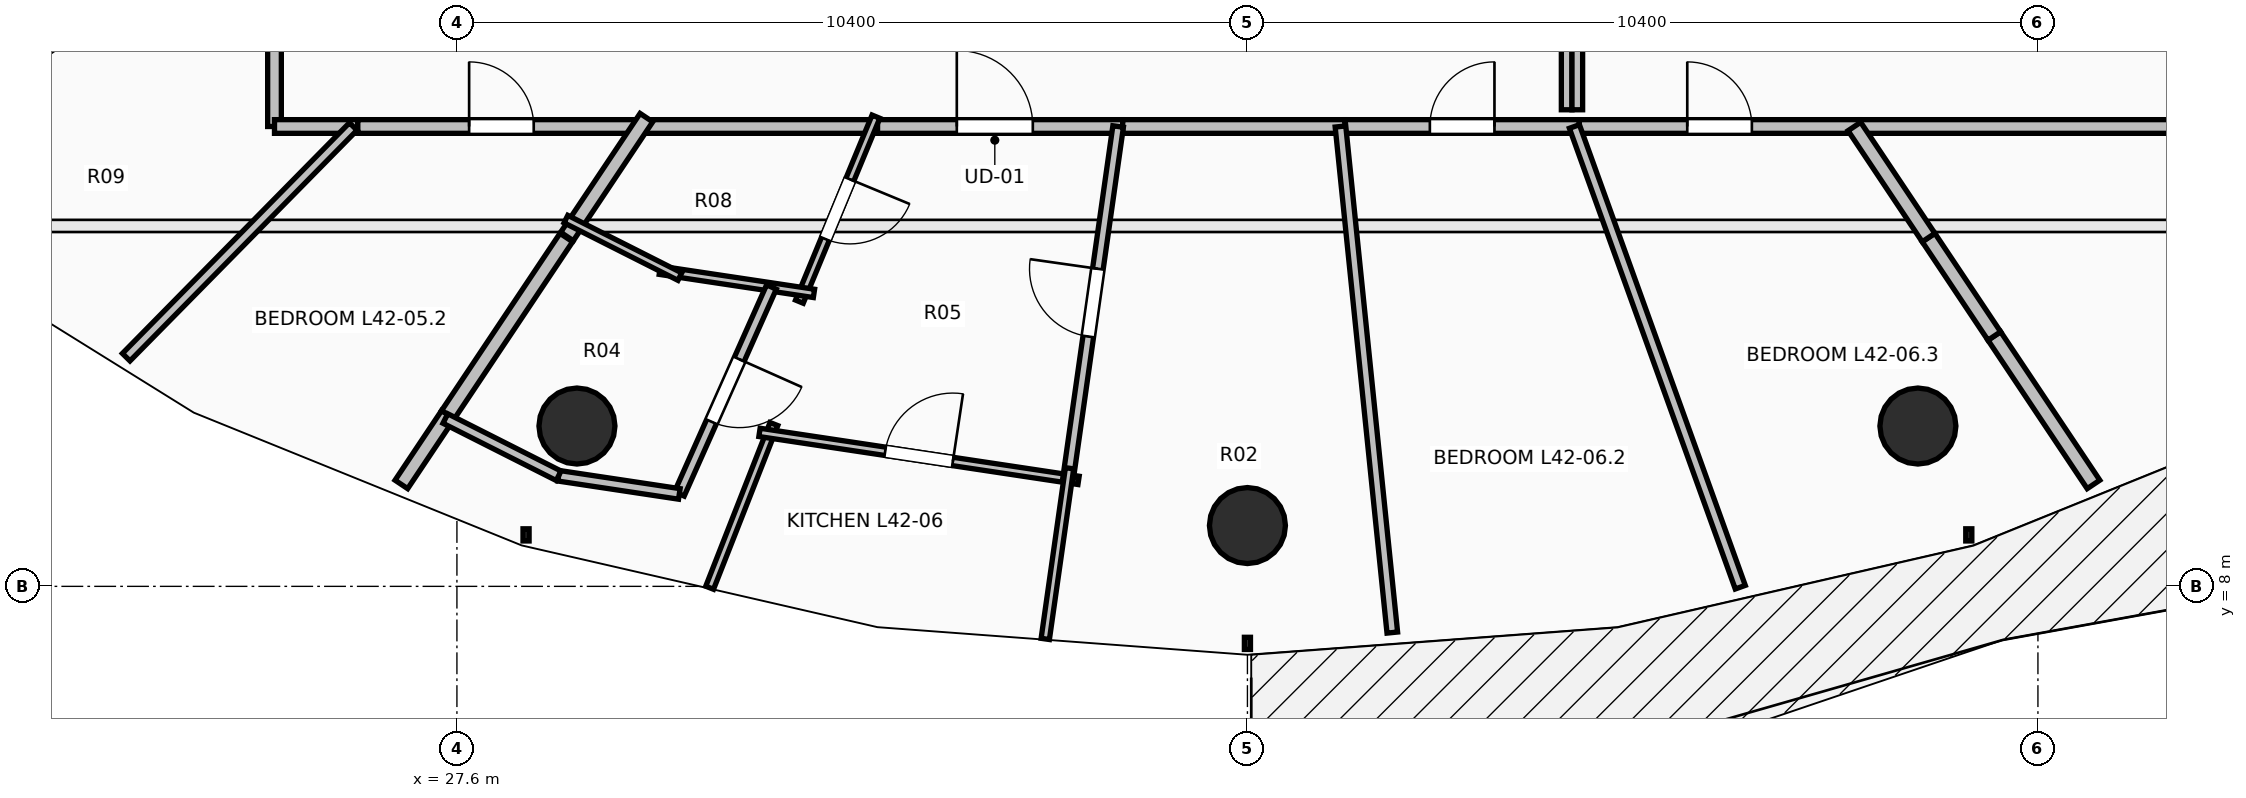
"""IFC4 building model, lengths in metres.
Left out: names, types, materials, properties, quantities, classifications, styles, units other than length and angle.
Written with IfcOpenShell. Run it as: python <this file> out.ifc"""

import sys

from ifc_helpers import new_model, si_unit, direction, frame, frame_2d, origin, origin_2d, place, context, subcontext, project, spatial, rectangle, circle, extrude, element, fill, save


model = new_model("IFC4")
c1 = context("Model", 3, precision=1e-05, world=origin(), true_north=direction((0.0, 1.0)))
c2 = subcontext(c1, "Body", "Model", "MODEL_VIEW")
j1 = project(units=[si_unit("LENGTHUNIT", "METRE"), si_unit("PLANEANGLEUNIT", "RADIAN")], contexts=[c1])
p1 = place(None, origin())
s1 = spatial("IfcSite", under=j1, at=p1, CompositionType="ELEMENT")
p2 = place(p1, origin())
s2 = spatial("IfcBuilding", under=s1, at=p2, CompositionType="ELEMENT")
p3 = place(p2, frame((0.0, 0.0, 157.1)))
s3 = spatial("IfcBuildingStorey", under=s2, at=p3, CompositionType="ELEMENT", Elevation=157.1)
for number, where, z_axis, x_axis in (
    (1, (29.179, 10.109, 0.0), (0.0, 0.0, 1.0), (-0.383, -0.924, 0.0)),
    (2, (38.0, 8.8, 0.0), (0.0, 0.0, 1.0), (0.0, -1.0, 0.0)),
    (3, (46.821, 10.109, 0.0), (0.0, 0.0, 1.0), (0.383, -0.924, 0.0)),
):
    element("IfcColumn", number, at=place(p3, frame(where, z_axis=z_axis, x_axis=x_axis)), inside=s3, PredefinedType="COLUMN", context=c2, shape_type="SweptSolid", body=[
        extrude(circle(Radius=0.5, at=origin_2d()), origin(), (0.0, 0.0, 1.0), 3.5),
    ])
p4 = place(p3, frame((25.2, 17.08, 0.0), z_axis=(0.0, 0.0, 1.0), x_axis=(0.0, -1.0, 0.0)))
e4 = element("IfcWall", 4, at=p4, inside=s3, PredefinedType="PARTITIONING", context=c2, shape_type="SweptSolid", body=[
    extrude(rectangle(XDim=3.03, YDim=0.18, at=frame_2d((1.515, 0.0))), origin(), (0.0, 0.0, 1.0), 2.432),
])
p5 = place(p3, frame((25.2, 14.05, 0.0), z_axis=(0.0, 0.0, 1.0), x_axis=(1.0, 0.0, 0.0)))
e5 = element("IfcWall", 5, at=p5, inside=s3, PredefinedType="PARTITIONING", context=c2, shape_type="SweptSolid", body=[
    extrude(rectangle(XDim=1.096, YDim=0.18, at=frame_2d((0.548, 0.0))), origin(), (0.0, 0.0, 1.0), 2.972),
])
p6 = place(p3, frame((26.296, 14.05, 0.0), z_axis=(0.0, 0.0, 1.0), x_axis=(1.0, 0.0, 0.0)))
e6 = element("IfcWall", 6, at=p6, inside=s3, PredefinedType="PARTITIONING", context=c2, shape_type="SweptSolid", body=[
    extrude(rectangle(XDim=3.779, YDim=0.18, at=frame_2d((1.89, 0.0))), origin(), (0.0, 0.0, 1.0), 2.432),
])
p7 = place(p6, frame((1.465, 0.0, 0.0)))
e7 = element("IfcOpeningElement", 7, at=p7, cuts=e6, PredefinedType="OPENING", context=c2, shape_type="SweptSolid", body=[
    extrude(rectangle(XDim=0.85, YDim=2.1, at=frame_2d((0.425, 1.05))), frame((0.0, 0.105, 0.0), z_axis=(0.0, -1.0, 0.0), x_axis=(1.0, 0.0, 0.0)), (0.0, 0.0, 1.0), 0.21),
])
p8 = place(p3, frame((32.994, 14.05, 0.0), z_axis=(0.0, 0.0, 1.0), x_axis=(1.0, 0.0, 0.0)))
e8 = element("IfcWall", 8, at=p8, inside=s3, PredefinedType="PARTITIONING", context=c2, shape_type="SweptSolid", body=[
    extrude(rectangle(XDim=3.365, YDim=0.18, at=frame_2d((1.683, 0.0))), origin(), (0.0, 0.0, 1.0), 2.886),
])
p9 = place(p8, frame((1.183, 0.0, 0.0)))
e9 = element("IfcOpeningElement", 9, at=p9, cuts=e8, PredefinedType="OPENING", context=c2, shape_type="SweptSolid", body=[
    extrude(rectangle(XDim=1.0, YDim=2.15, at=frame_2d((0.5, 1.075))), frame((0.0, 0.105, 0.0), z_axis=(0.0, -1.0, 0.0), x_axis=(1.0, 0.0, 0.0)), (0.0, 0.0, 1.0), 0.21),
])
p10 = place(p3, frame((29.935, 14.05, 0.0), z_axis=(0.0, 0.0, 1.0), x_axis=(1.0, 0.0, 0.0)))
e10 = element("IfcWall", 10, at=p10, inside=s3, PredefinedType="PARTITIONING", context=c2, shape_type="SweptSolid", body=[
    extrude(rectangle(XDim=3.199, YDim=0.18, at=frame_2d((1.6, 0.0))), origin(), (0.0, 0.0, 1.0), 3.24),
])
p11 = place(p3, frame((36.359, 14.05, 0.0), z_axis=(0.0, 0.0, 1.0), x_axis=(1.0, 0.0, 0.0)))
e11 = element("IfcWall", 11, at=p11, inside=s3, PredefinedType="PARTITIONING", context=c2, shape_type="SweptSolid", body=[
    extrude(rectangle(XDim=2.925, YDim=0.18, at=frame_2d((1.462, 0.0))), origin(), (0.0, 0.0, 1.0), 2.886),
])
p12 = place(p3, frame((39.284, 14.05, 0.0), z_axis=(0.0, 0.0, 1.0), x_axis=(1.0, 0.0, 0.0)))
e12 = element("IfcWall", 12, at=p12, inside=s3, PredefinedType="PARTITIONING", context=c2, shape_type="SweptSolid", body=[
    extrude(rectangle(XDim=3.082, YDim=0.18, at=frame_2d((1.541, 0.0))), origin(), (0.0, 0.0, 1.0), 2.886),
])
p13 = place(p12, frame((1.116, 0.0, 0.0)))
e13 = element("IfcOpeningElement", 13, at=p13, cuts=e12, PredefinedType="OPENING", context=c2, shape_type="SweptSolid", body=[
    extrude(rectangle(XDim=0.85, YDim=2.1, at=frame_2d((0.425, 1.05))), frame((0.0, 0.105, 0.0), z_axis=(0.0, -1.0, 0.0), x_axis=(1.0, 0.0, 0.0)), (0.0, 0.0, 1.0), 0.21),
])
p14 = place(p3, frame((42.366, 14.05, 0.0), z_axis=(0.0, 0.0, 1.0), x_axis=(1.0, 0.0, 0.0)))
e14 = element("IfcWall", 14, at=p14, inside=s3, PredefinedType="PARTITIONING", context=c2, shape_type="SweptSolid", body=[
    extrude(rectangle(XDim=3.691, YDim=0.18, at=frame_2d((1.845, 0.0))), origin(), (0.0, 0.0, 1.0), 2.432),
])
p15 = place(p14, frame((1.42, 0.0, 0.0)))
e15 = element("IfcOpeningElement", 15, at=p15, cuts=e14, PredefinedType="OPENING", context=c2, shape_type="SweptSolid", body=[
    extrude(rectangle(XDim=0.85, YDim=2.1, at=frame_2d((0.425, 1.05))), frame((0.0, 0.105, 0.0), z_axis=(0.0, -1.0, 0.0), x_axis=(1.0, 0.0, 0.0)), (0.0, 0.0, 1.0), 0.21),
])
p16 = place(p3, frame((46.057, 14.05, 0.0), z_axis=(0.0, 0.0, 1.0), x_axis=(1.0, 0.0, 0.0)))
e16 = element("IfcWall", 16, at=p16, inside=s3, PredefinedType="PARTITIONING", context=c2, shape_type="SweptSolid", body=[
    extrude(rectangle(XDim=4.743, YDim=0.18, at=frame_2d((2.372, 0.0))), origin(), (0.0, 0.0, 1.0), 2.432),
])
p17 = place(p3, frame((21.71, 14.741, 0.0), z_axis=(0.0, 0.0, 1.0), x_axis=(0.822672586971, 0.568515448027, 0.0)))
e17 = element("IfcWall", 17, at=p17, inside=s3, PredefinedType="PARTITIONING", context=c2, shape_type="SweptSolid", body=[
    extrude(rectangle(XDim=4.242, YDim=0.14, at=frame_2d((2.121, 0.0))), origin(), (0.0, 0.0, 1.0), 2.432),
])
p18 = place(p17, frame((1.671, 0.0, 0.0)))
e18 = element("IfcOpeningElement", 18, at=p18, cuts=e17, PredefinedType="OPENING", context=c2, shape_type="SweptSolid", body=[
    extrude(rectangle(XDim=0.9, YDim=2.1, at=frame_2d((0.45, 1.05))), frame((0.0, 0.085, 0.0), z_axis=(0.0, -1.0, 0.0), x_axis=(1.0, 0.0, 0.0)), (0.0, 0.0, 1.0), 0.17),
])
p19 = place(p3, frame((23.249, 11.015, 0.0), z_axis=(0.0, 0.0, 1.0), x_axis=(0.701437189486, 0.712731274188, 0.0)))
e19 = element("IfcWall", 19, at=p19, inside=s3, PredefinedType="PARTITIONING", context=c2, shape_type="SweptSolid", body=[
    extrude(rectangle(XDim=4.259, YDim=0.14, at=frame_2d((2.129, 0.0))), origin(), (0.0, 0.0, 1.0), 2.728),
])
p20 = place(p3, frame((26.869, 9.341, 0.0), z_axis=(0.0, 0.0, 1.0), x_axis=(0.555772359104, 0.831334520428, 0.0)))
e20 = element("IfcWall", 20, at=p20, inside=s3, PredefinedType="PARTITIONING", context=c2, shape_type="SweptSolid", body=[
    extrude(rectangle(XDim=1.103, YDim=0.2, at=frame_2d((0.552, 0.0))), origin(), (0.0, 0.0, 1.0), 3.24),
])
p21 = place(p3, frame((29.048, 12.603, 0.0), z_axis=(0.0, 0.0, 1.0), x_axis=(0.555448864434, 0.831550695387, 0.0)))
e21 = element("IfcWall", 21, at=p21, inside=s3, PredefinedType="PARTITIONING", context=c2, shape_type="SweptSolid", body=[
    extrude(rectangle(XDim=1.881, YDim=0.2, at=frame_2d((0.94, 0.0))), origin(), (0.0, 0.0, 1.0), 2.886),
])
p22 = place(p3, frame((27.482, 10.258, 0.0), z_axis=(0.0, 0.0, 1.0), x_axis=(0.5554636799, 0.831540798946, 0.0)))
e22 = element("IfcWall", 22, at=p22, inside=s3, PredefinedType="PARTITIONING", context=c2, shape_type="SweptSolid", body=[
    extrude(rectangle(XDim=2.803, YDim=0.2, at=frame_2d((1.402, 0.0))), origin(), (0.0, 0.0, 1.0), 2.432),
])
p23 = place(p3, frame((33.113, 14.179, 0.0), z_axis=(0.0, 0.0, 1.0), x_axis=(-0.382343605935, -0.924020220017, 0.0)))
e23 = element("IfcWall", 23, at=p23, inside=s3, PredefinedType="PARTITIONING", context=c2, shape_type="SweptSolid", body=[
    extrude(rectangle(XDim=2.634, YDim=0.11, at=frame_2d((1.317, 0.0))), origin(), (0.0, 0.0, 1.0), 2.886),
])
p24 = place(p23, frame((0.892, 0.0, 0.0)))
e24 = element("IfcOpeningElement", 24, at=p24, cuts=e23, PredefinedType="OPENING", context=c2, shape_type="SweptSolid", body=[
    extrude(rectangle(XDim=0.85, YDim=2.1, at=frame_2d((0.425, 1.05))), frame((0.0, 0.07, 0.0), z_axis=(0.0, -1.0, 0.0), x_axis=(1.0, 0.0, 0.0)), (0.0, 0.0, 1.0), 0.14),
])
p25 = place(p3, frame((32.297, 11.854, 0.0), z_axis=(0.0, 0.0, 1.0), x_axis=(-0.988917131865, 0.148468536412, 0.0)))
e25 = element("IfcWall", 25, at=p25, inside=s3, PredefinedType="PARTITIONING", context=c2, shape_type="SweptSolid", body=[
    extrude(rectangle(XDim=2.051, YDim=0.11, at=frame_2d((1.025, 0.0))), origin(), (0.0, 0.0, 1.0), 3.24),
])
p26 = place(p3, frame((30.925, 7.982, 0.0), z_axis=(0.0, 0.0, 1.0), x_axis=(0.365433616255, 0.930837403691, 0.0)))
e26 = element("IfcWall", 26, at=p26, inside=s3, PredefinedType="PARTITIONING", context=c2, shape_type="SweptSolid", body=[
    extrude(rectangle(XDim=2.313, YDim=0.11, at=frame_2d((1.157, 0.0))), origin(), (0.0, 0.0, 1.0), 2.728),
])
p27 = place(p3, frame((31.581, 10.026, 0.0), z_axis=(0.0, 0.0, 1.0), x_axis=(0.988869600434, -0.148784788666, 0.0)))
e27 = element("IfcWall", 27, at=p27, inside=s3, PredefinedType="PARTITIONING", context=c2, shape_type="SweptSolid", body=[
    extrude(rectangle(XDim=4.245, YDim=0.11, at=frame_2d((2.123, 0.0))), origin(), (0.0, 0.0, 1.0), 3.24),
])
p28 = place(p27, frame((1.673, 0.0, 0.0)))
e28 = element("IfcOpeningElement", 28, at=p28, cuts=e27, PredefinedType="OPENING", context=c2, shape_type="SweptSolid", body=[
    extrude(rectangle(XDim=0.9, YDim=2.1, at=frame_2d((0.45, 1.05))), frame((0.0, 0.07, 0.0), z_axis=(0.0, -1.0, 0.0), x_axis=(1.0, 0.0, 0.0)), (0.0, 0.0, 1.0), 0.14),
])
p29 = place(p3, frame((31.738, 11.938, 0.0), z_axis=(0.0, 0.0, 1.0), x_axis=(-0.406814964782, -0.913510582549, 0.0)))
e29 = element("IfcWall", 29, at=p29, inside=s3, PredefinedType="PARTITIONING", context=c2, shape_type="SweptSolid", body=[
    extrude(rectangle(XDim=2.98, YDim=0.14, at=frame_2d((1.49, 0.0))), origin(), (0.0, 0.0, 1.0), 2.728),
])
p30 = place(p29, frame((1.04, 0.0, 0.0)))
e30 = element("IfcOpeningElement", 30, at=p30, cuts=e29, PredefinedType="OPENING", context=c2, shape_type="SweptSolid", body=[
    extrude(rectangle(XDim=0.9, YDim=2.1, at=frame_2d((0.45, 1.05))), frame((0.0, 0.085, 0.0), z_axis=(0.0, -1.0, 0.0), x_axis=(1.0, 0.0, 0.0)), (0.0, 0.0, 1.0), 0.17),
])
p31 = place(p3, frame((30.526, 9.216, 0.0), z_axis=(0.0, 0.0, 1.0), x_axis=(-0.988860390109, 0.148845990455, 0.0)))
e31 = element("IfcWall", 31, at=p31, inside=s3, PredefinedType="PARTITIONING", context=c2, shape_type="SweptSolid", body=[
    extrude(rectangle(XDim=1.606, YDim=0.14, at=frame_2d((0.803, 0.0))), origin(), (0.0, 0.0, 1.0), 3.24),
])
p32 = place(p3, frame((28.938, 9.455, 0.0), z_axis=(0.0, 0.0, 1.0), x_axis=(-0.892517956507, 0.451011859392, 0.0)))
e32 = element("IfcWall", 32, at=p32, inside=s3, PredefinedType="PARTITIONING", context=c2, shape_type="SweptSolid", body=[
    extrude(rectangle(XDim=1.669, YDim=0.14, at=frame_2d((0.835, 0.0))), origin(), (0.0, 0.0, 1.0), 3.24),
])
p33 = place(p3, frame((35.64, 9.415, 0.0), z_axis=(0.0, 0.0, 1.0), x_axis=(0.140800762129, 0.990037951487, 0.0)))
e33 = element("IfcWall", 33, at=p33, inside=s3, PredefinedType="PARTITIONING", context=c2, shape_type="SweptSolid", body=[
    extrude(rectangle(XDim=4.682, YDim=0.14, at=frame_2d((2.341, 0.0))), origin(), (0.0, 0.0, 1.0), 2.886),
])
p34 = place(p33, frame((1.891, 0.0, 0.0)))
e34 = element("IfcOpeningElement", 34, at=p34, cuts=e33, PredefinedType="OPENING", context=c2, shape_type="SweptSolid", body=[
    extrude(rectangle(XDim=0.9, YDim=2.1, at=frame_2d((0.45, 1.05))), frame((0.0, 0.085, 0.0), z_axis=(0.0, -1.0, 0.0), x_axis=(1.0, 0.0, 0.0)), (0.0, 0.0, 1.0), 0.17),
])
p35 = place(p3, frame((29.034, 12.832, 0.0), z_axis=(0.0, 0.0, 1.0), x_axis=(0.892617244745, -0.450815321816, 0.0)))
e35 = element("IfcWall", 35, at=p35, inside=s3, PredefinedType="PARTITIONING", context=c2, shape_type="SweptSolid", body=[
    extrude(rectangle(XDim=1.679, YDim=0.11, at=frame_2d((0.84, 0.0))), origin(), (0.0, 0.0, 1.0), 2.972),
])
p36 = place(p3, frame((35.34, 7.308, 0.0), z_axis=(0.0, 0.0, 1.0), x_axis=(0.140803429846, 0.990037572087, 0.0)))
e36 = element("IfcWall", 36, at=p36, inside=s3, PredefinedType="PARTITIONING", context=c2, shape_type="SweptSolid", body=[
    extrude(rectangle(XDim=2.268, YDim=0.11, at=frame_2d((1.134, 0.0))), origin(), (0.0, 0.0, 1.0), 2.728),
])
p37 = place(p3, frame((39.906, 7.392, 0.0), z_axis=(0.0, 0.0, 1.0), x_axis=(-0.101883545041, 0.994796332547, 0.0)))
e37 = element("IfcWall", 37, at=p37, inside=s3, PredefinedType="PARTITIONING", context=c2, shape_type="SweptSolid", body=[
    extrude(rectangle(XDim=6.693, YDim=0.14, at=frame_2d((3.346, 0.0))), origin(), (0.0, 0.0, 1.0), 2.432),
])
p38 = place(p3, frame((44.484, 7.989, 0.0), z_axis=(0.0, 0.0, 1.0), x_axis=(-0.338707389808, 0.940891760028, 0.0)))
e38 = element("IfcWall", 38, at=p38, inside=s3, PredefinedType="PARTITIONING", context=c2, shape_type="SweptSolid", body=[
    extrude(rectangle(XDim=6.442, YDim=0.14, at=frame_2d((3.221, 0.0))), origin(), (0.0, 0.0, 1.0), 2.432),
])
p39 = place(p3, frame((49.131, 9.341, 0.0), z_axis=(0.0, 0.0, 1.0), x_axis=(-0.555659266741, 0.831410114976, 0.0)))
e39 = element("IfcWall", 39, at=p39, inside=s3, PredefinedType="PARTITIONING", context=c2, shape_type="SweptSolid", body=[
    extrude(rectangle(XDim=2.349, YDim=0.2, at=frame_2d((1.174, 0.0))), origin(), (0.0, 0.0, 1.0), 2.728),
])
p40 = place(p3, frame((47.826, 11.294, 0.0), z_axis=(0.0, 0.0, 1.0), x_axis=(-0.55538732275, 0.831591799941, 0.0)))
e40 = element("IfcWall", 40, at=p40, inside=s3, PredefinedType="PARTITIONING", context=c2, shape_type="SweptSolid", body=[
    extrude(rectangle(XDim=1.557, YDim=0.2, at=frame_2d((0.779, 0.0))), origin(), (0.0, 0.0, 1.0), 2.432),
])
p41 = place(p3, frame((46.961, 12.589, 0.0), z_axis=(0.0, 0.0, 1.0), x_axis=(-0.555437554373, 0.83155825003, 0.0)))
e41 = element("IfcWall", 41, at=p41, inside=s3, PredefinedType="PARTITIONING", context=c2, shape_type="SweptSolid", body=[
    extrude(rectangle(XDim=1.757, YDim=0.2, at=frame_2d((0.878, 0.0))), origin(), (0.0, 0.0, 1.0), 2.886),
])
for number, where, z_axis, x_axis in (
    (42, (42.2, 16.1, 0.0), (0.0, 0.0, 1.0), (0.0, -1.0, 0.0)),
    (43, (42.34, 14.27, 0.0), (0.0, 0.0, 1.0), (0.0, 1.0, 0.0)),
):
    element("IfcWall", number, at=place(p3, frame(where, z_axis=z_axis, x_axis=x_axis)), inside=s3, PredefinedType="PARTITIONING", context=c2, shape_type="SweptSolid", body=[
        extrude(rectangle(XDim=1.83, YDim=0.14, at=frame_2d((0.915, 0.0))), origin(), (0.0, 0.0, 1.0), 2.886),
    ])
p42 = place(p9, origin())
e44 = element("IfcDoor", 44, at=p42, inside=s3, OperationType="SINGLE_SWING_LEFT", PredefinedType="DOOR", context=c2, shape_type="SweptSolid", body=[
    extrude(rectangle(XDim=1.0, YDim=2.15, at=frame_2d((0.5, 1.075))), frame((0.0, 0.025, 0.0), z_axis=(0.0, -1.0, 0.0), x_axis=(1.0, 0.0, 0.0)), (0.0, 0.0, 1.0), 0.05),
])
fill(e9, e44)
p43 = place(p24, origin())
e45 = element("IfcDoor", 45, at=p43, inside=s3, OperationType="SINGLE_SWING_LEFT", PredefinedType="DOOR", context=c2, shape_type="SweptSolid", body=[
    extrude(rectangle(XDim=0.85, YDim=2.1, at=frame_2d((0.425, 1.05))), frame((0.0, 0.025, 0.0), z_axis=(0.0, -1.0, 0.0), x_axis=(1.0, 0.0, 0.0)), (0.0, 0.0, 1.0), 0.05),
])
fill(e24, e45)
p44 = place(p28, origin())
e46 = element("IfcDoor", 46, at=p44, inside=s3, OperationType="SINGLE_SWING_RIGHT", PredefinedType="DOOR", context=c2, shape_type="SweptSolid", body=[
    extrude(rectangle(XDim=0.9, YDim=2.1, at=frame_2d((0.45, 1.05))), frame((0.0, 0.025, 0.0), z_axis=(0.0, -1.0, 0.0), x_axis=(1.0, 0.0, 0.0)), (0.0, 0.0, 1.0), 0.05),
])
fill(e28, e46)
p45 = place(p30, origin())
e47 = element("IfcDoor", 47, at=p45, inside=s3, OperationType="SINGLE_SWING_LEFT", PredefinedType="DOOR", context=c2, shape_type="SweptSolid", body=[
    extrude(rectangle(XDim=0.9, YDim=2.1, at=frame_2d((0.45, 1.05))), frame((0.0, 0.025, 0.0), z_axis=(0.0, -1.0, 0.0), x_axis=(1.0, 0.0, 0.0)), (0.0, 0.0, 1.0), 0.05),
])
fill(e30, e47)
p46 = place(p34, origin())
e48 = element("IfcDoor", 48, at=p46, inside=s3, OperationType="SINGLE_SWING_RIGHT", PredefinedType="DOOR", context=c2, shape_type="SweptSolid", body=[
    extrude(rectangle(XDim=0.9, YDim=2.1, at=frame_2d((0.45, 1.05))), frame((0.0, 0.025, 0.0), z_axis=(0.0, -1.0, 0.0), x_axis=(1.0, 0.0, 0.0)), (0.0, 0.0, 1.0), 0.05),
])
fill(e34, e48)
p47 = place(p7, origin())
e49 = element("IfcDoor", 49, at=p47, inside=s3, OperationType="SINGLE_SWING_LEFT", PredefinedType="DOOR", context=c2, shape_type="SweptSolid", body=[
    extrude(rectangle(XDim=0.85, YDim=2.1, at=frame_2d((0.425, 1.05))), frame((0.0, 0.025, 0.0), z_axis=(0.0, -1.0, 0.0), x_axis=(1.0, 0.0, 0.0)), (0.0, 0.0, 1.0), 0.05),
])
fill(e7, e49)
p48 = place(p13, origin())
e50 = element("IfcDoor", 50, at=p48, inside=s3, OperationType="SINGLE_SWING_RIGHT", PredefinedType="DOOR", context=c2, shape_type="SweptSolid", body=[
    extrude(rectangle(XDim=0.85, YDim=2.1, at=frame_2d((0.425, 1.05))), frame((0.0, 0.025, 0.0), z_axis=(0.0, -1.0, 0.0), x_axis=(1.0, 0.0, 0.0)), (0.0, 0.0, 1.0), 0.05),
])
fill(e13, e50)
p49 = place(p15, origin())
e51 = element("IfcDoor", 51, at=p49, inside=s3, OperationType="SINGLE_SWING_LEFT", PredefinedType="DOOR", context=c2, shape_type="SweptSolid", body=[
    extrude(rectangle(XDim=0.85, YDim=2.1, at=frame_2d((0.425, 1.05))), frame((0.0, 0.025, 0.0), z_axis=(0.0, -1.0, 0.0), x_axis=(1.0, 0.0, 0.0)), (0.0, 0.0, 1.0), 0.05),
])
fill(e15, e51)
save(model, sys.argv[1])
